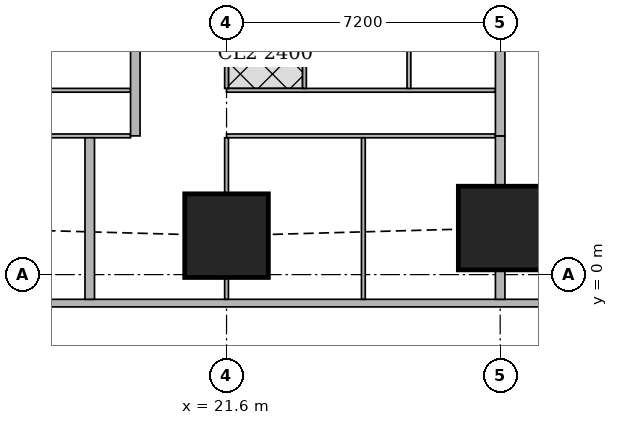
"""IFC4 building model, lengths in metres.
Left out: names, types, materials, properties, quantities, classifications, styles, units other than length and angle.
Written with IfcOpenShell. Run it as: python <this file> out.ifc"""

import sys

from ifc_helpers import new_model, si_unit, direction, frame, frame_2d, origin, origin_2d, place, context, subcontext, project, spatial, rectangle, extrude, element, fill, save


model = new_model("IFC4")
c1 = context("Model", 3, precision=1e-05, world=origin(), true_north=direction((0.0, 1.0)))
c2 = subcontext(c1, "Body", "Model", "MODEL_VIEW")
j1 = project(units=[si_unit("LENGTHUNIT", "METRE"), si_unit("PLANEANGLEUNIT", "RADIAN")], contexts=[c1])
p1 = place(None, origin())
s1 = spatial("IfcSite", under=j1, at=p1, CompositionType="ELEMENT")
p2 = place(p1, origin())
s2 = spatial("IfcBuilding", under=s1, at=p2, CompositionType="ELEMENT")
p3 = place(p2, frame((0.0, 0.0, 111.65)))
s3 = spatial("IfcBuildingStorey", under=s2, at=p3, CompositionType="ELEMENT", Elevation=111.65)
for number, where, z_axis, x_axis in (
    (1, (21.6, 1.025, 0.0), (0.0, 0.0, 1.0), (1.0, 0.0, 0.0)),
    (2, (28.8, 1.225, 0.0), (0.0, 0.0, 1.0), (1.0, 0.0, 0.0)),
):
    element("IfcColumn", number, at=place(p3, frame(where, z_axis=z_axis, x_axis=x_axis)), inside=s3, PredefinedType="COLUMN", context=c2, shape_type="SweptSolid", body=[
        extrude(rectangle(XDim=2.2, YDim=2.2, at=origin_2d()), origin(), (0.0, 0.0, 1.0), 3.75),
    ])
p4 = place(p3, frame((2.163, -0.75, 0.0), z_axis=(0.0, 0.0, 1.0), x_axis=(1.0, 0.0, 0.0)))
e3 = element("IfcWall", 3, at=p4, inside=s3, PredefinedType="SOLIDWALL", context=c2, shape_type="SweptSolid", body=[
    extrude(rectangle(XDim=45.628, YDim=0.2, at=frame_2d((22.814, 0.0))), origin(), (0.0, 0.0, 1.0), 3.5),
])
p5 = place(p4, frame((9.537, 0.0, 0.9)))
e4 = element("IfcOpeningElement", 4, at=p5, cuts=e3, PredefinedType="OPENING", context=c2, shape_type="SweptSolid", body=[
    extrude(rectangle(XDim=1.8, YDim=1.5, at=frame_2d((0.9, 0.75))), frame((0.0, 0.11, 0.0), z_axis=(0.0, -1.0, 0.0), x_axis=(1.0, 0.0, 0.0)), (0.0, 0.0, 1.0), 0.22),
])
p6 = place(p4, frame((13.137, 0.0, 0.9)))
e5 = element("IfcOpeningElement", 5, at=p6, cuts=e3, PredefinedType="OPENING", context=c2, shape_type="SweptSolid", body=[
    extrude(rectangle(XDim=1.8, YDim=1.5, at=frame_2d((0.9, 0.75))), frame((0.0, 0.11, 0.0), z_axis=(0.0, -1.0, 0.0), x_axis=(1.0, 0.0, 0.0)), (0.0, 0.0, 1.0), 0.22),
])
p7 = place(p4, frame((16.737, 0.0, 0.9)))
e6 = element("IfcOpeningElement", 6, at=p7, cuts=e3, PredefinedType="OPENING", context=c2, shape_type="SweptSolid", body=[
    extrude(rectangle(XDim=1.8, YDim=1.5, at=frame_2d((0.9, 0.75))), frame((0.0, 0.11, 0.0), z_axis=(0.0, -1.0, 0.0), x_axis=(1.0, 0.0, 0.0)), (0.0, 0.0, 1.0), 0.22),
])
p8 = place(p4, frame((20.337, 0.0, 0.9)))
e7 = element("IfcOpeningElement", 7, at=p8, cuts=e3, PredefinedType="OPENING", context=c2, shape_type="SweptSolid", body=[
    extrude(rectangle(XDim=1.8, YDim=1.5, at=frame_2d((0.9, 0.75))), frame((0.0, 0.11, 0.0), z_axis=(0.0, -1.0, 0.0), x_axis=(1.0, 0.0, 0.0)), (0.0, 0.0, 1.0), 0.22),
])
p9 = place(p4, frame((23.937, 0.0, 0.9)))
e8 = element("IfcOpeningElement", 8, at=p9, cuts=e3, PredefinedType="OPENING", context=c2, shape_type="SweptSolid", body=[
    extrude(rectangle(XDim=1.8, YDim=1.5, at=frame_2d((0.9, 0.75))), frame((0.0, 0.11, 0.0), z_axis=(0.0, -1.0, 0.0), x_axis=(1.0, 0.0, 0.0)), (0.0, 0.0, 1.0), 0.22),
])
p10 = place(p4, frame((27.537, 0.0, 0.9)))
e9 = element("IfcOpeningElement", 9, at=p10, cuts=e3, PredefinedType="OPENING", context=c2, shape_type="SweptSolid", body=[
    extrude(rectangle(XDim=1.8, YDim=1.5, at=frame_2d((0.9, 0.75))), frame((0.0, 0.11, 0.0), z_axis=(0.0, -1.0, 0.0), x_axis=(1.0, 0.0, 0.0)), (0.0, 0.0, 1.0), 0.22),
])
p11 = place(p4, frame((31.137, 0.0, 0.9)))
e10 = element("IfcOpeningElement", 10, at=p11, cuts=e3, PredefinedType="OPENING", context=c2, shape_type="SweptSolid", body=[
    extrude(rectangle(XDim=1.8, YDim=1.5, at=frame_2d((0.9, 0.75))), frame((0.0, 0.11, 0.0), z_axis=(0.0, -1.0, 0.0), x_axis=(1.0, 0.0, 0.0)), (0.0, 0.0, 1.0), 0.22),
])
p12 = place(p4, frame((34.737, 0.0, 0.9)))
e11 = element("IfcOpeningElement", 11, at=p12, cuts=e3, PredefinedType="OPENING", context=c2, shape_type="SweptSolid", body=[
    extrude(rectangle(XDim=1.8, YDim=1.5, at=frame_2d((0.9, 0.75))), frame((0.0, 0.11, 0.0), z_axis=(0.0, -1.0, 0.0), x_axis=(1.0, 0.0, 0.0)), (0.0, 0.0, 1.0), 0.22),
])
p13 = place(p3, frame((19.074, 3.65, 0.0), z_axis=(0.0, 0.0, 1.0), x_axis=(-1.0, 0.0, 0.0)))
e12 = element("IfcWall", 12, at=p13, inside=s3, PredefinedType="PARTITIONING", context=c2, shape_type="SweptSolid", body=[
    extrude(rectangle(XDim=4.674, YDim=0.1, at=frame_2d((2.337, 0.0))), origin(), (0.0, 0.0, 1.0), 3.5),
])
p14 = place(p13, frame((3.574, 0.0, 0.0)))
e13 = element("IfcOpeningElement", 13, at=p14, cuts=e12, PredefinedType="OPENING", context=c2, shape_type="SweptSolid", body=[
    extrude(rectangle(XDim=0.9, YDim=2.1, at=frame_2d((0.45, 1.05))), frame((0.0, 0.06, 0.0), z_axis=(0.0, -1.0, 0.0), x_axis=(1.0, 0.0, 0.0)), (0.0, 0.0, 1.0), 0.12),
])
p15 = place(p3, frame((19.074, 4.85, 0.0), z_axis=(0.0, 0.0, 1.0), x_axis=(-1.0, 0.0, 0.0)))
e14 = element("IfcWall", 14, at=p15, inside=s3, PredefinedType="PARTITIONING", context=c2, shape_type="SweptSolid", body=[
    extrude(rectangle(XDim=4.674, YDim=0.1, at=frame_2d((2.337, 0.0))), origin(), (0.0, 0.0, 1.0), 3.5),
])
p16 = place(p15, frame((3.199, 0.0, 0.0)))
e15 = element("IfcOpeningElement", 15, at=p16, cuts=e14, PredefinedType="OPENING", context=c2, shape_type="SweptSolid", body=[
    extrude(rectangle(XDim=0.9, YDim=2.1, at=frame_2d((0.45, 1.05))), frame((0.0, 0.06, 0.0), z_axis=(0.0, -1.0, 0.0), x_axis=(1.0, 0.0, 0.0)), (0.0, 0.0, 1.0), 0.12),
])
p17 = place(p15, frame((0.799, 0.0, 0.0)))
e16 = element("IfcOpeningElement", 16, at=p17, cuts=e14, PredefinedType="OPENING", context=c2, shape_type="SweptSolid", body=[
    extrude(rectangle(XDim=0.9, YDim=2.1, at=frame_2d((0.45, 1.05))), frame((0.0, 0.06, 0.0), z_axis=(0.0, -1.0, 0.0), x_axis=(1.0, 0.0, 0.0)), (0.0, 0.0, 1.0), 0.12),
])
p18 = place(p3, frame((28.675, 3.65, 0.0), z_axis=(0.0, 0.0, 1.0), x_axis=(-1.0, 0.0, 0.0)))
e17 = element("IfcWall", 17, at=p18, inside=s3, PredefinedType="PARTITIONING", context=c2, shape_type="SweptSolid", body=[
    extrude(rectangle(XDim=7.075, YDim=0.1, at=frame_2d((3.538, 0.0))), origin(), (0.0, 0.0, 1.0), 3.5),
])
p19 = place(p18, frame((5.975, 0.0, 0.0)))
e18 = element("IfcOpeningElement", 18, at=p19, cuts=e17, PredefinedType="OPENING", context=c2, shape_type="SweptSolid", body=[
    extrude(rectangle(XDim=0.9, YDim=2.1, at=frame_2d((0.45, 1.05))), frame((0.0, 0.06, 0.0), z_axis=(0.0, -1.0, 0.0), x_axis=(1.0, 0.0, 0.0)), (0.0, 0.0, 1.0), 0.12),
])
p20 = place(p18, frame((2.375, 0.0, 0.0)))
e19 = element("IfcOpeningElement", 19, at=p20, cuts=e17, PredefinedType="OPENING", context=c2, shape_type="SweptSolid", body=[
    extrude(rectangle(XDim=0.9, YDim=2.1, at=frame_2d((0.45, 1.05))), frame((0.0, 0.06, 0.0), z_axis=(0.0, -1.0, 0.0), x_axis=(1.0, 0.0, 0.0)), (0.0, 0.0, 1.0), 0.12),
])
p21 = place(p3, frame((28.675, 4.85, 0.0), z_axis=(0.0, 0.0, 1.0), x_axis=(-1.0, 0.0, 0.0)))
e20 = element("IfcWall", 20, at=p21, inside=s3, PredefinedType="PARTITIONING", context=c2, shape_type="SweptSolid", body=[
    extrude(rectangle(XDim=7.075, YDim=0.1, at=frame_2d((3.538, 0.0))), origin(), (0.0, 0.0, 1.0), 3.5),
])
p22 = place(p21, frame((5.6, 0.0, 0.0)))
e21 = element("IfcOpeningElement", 21, at=p22, cuts=e20, PredefinedType="OPENING", context=c2, shape_type="SweptSolid", body=[
    extrude(rectangle(XDim=0.9, YDim=2.1, at=frame_2d((0.45, 1.05))), frame((0.0, 0.06, 0.0), z_axis=(0.0, -1.0, 0.0), x_axis=(1.0, 0.0, 0.0)), (0.0, 0.0, 1.0), 0.12),
])
p23 = place(p21, frame((0.626, 0.0, 0.0)))
e22 = element("IfcOpeningElement", 22, at=p23, cuts=e20, PredefinedType="OPENING", context=c2, shape_type="SweptSolid", body=[
    extrude(rectangle(XDim=0.9, YDim=2.1, at=frame_2d((0.45, 1.05))), frame((0.0, 0.06, 0.0), z_axis=(0.0, -1.0, 0.0), x_axis=(1.0, 0.0, 0.0)), (0.0, 0.0, 1.0), 0.12),
])
p24 = place(p21, frame((3.201, 0.0, 0.0)))
e23 = element("IfcOpeningElement", 23, at=p24, cuts=e20, PredefinedType="OPENING", context=c2, shape_type="SweptSolid", body=[
    extrude(rectangle(XDim=0.9, YDim=2.1, at=frame_2d((0.45, 1.05))), frame((0.0, 0.06, 0.0), z_axis=(0.0, -1.0, 0.0), x_axis=(1.0, 0.0, 0.0)), (0.0, 0.0, 1.0), 0.12),
])
p25 = place(p3, frame((21.6, -0.65, 0.0), z_axis=(0.0, 0.0, 1.0), x_axis=(0.0, 1.0, 0.0)))
e24 = element("IfcWall", 24, at=p25, inside=s3, PredefinedType="PARTITIONING", context=c2, shape_type="SweptSolid", body=[
    extrude(rectangle(XDim=0.574, YDim=0.1, at=frame_2d((0.287, 0.0))), origin(), (0.0, 0.0, 1.0), 3.5),
])
p26 = place(p3, frame((21.6, 2.126, 0.0), z_axis=(0.0, 0.0, 1.0), x_axis=(0.0, 1.0, 0.0)))
e25 = element("IfcWall", 25, at=p26, inside=s3, PredefinedType="PARTITIONING", context=c2, shape_type="SweptSolid", body=[
    extrude(rectangle(XDim=1.474, YDim=0.1, at=frame_2d((0.737, 0.0))), origin(), (0.0, 0.0, 1.0), 3.5),
])
p27 = place(p3, frame((25.2, -0.65, 0.0), z_axis=(0.0, 0.0, 1.0), x_axis=(0.0, 1.0, 0.0)))
e26 = element("IfcWall", 26, at=p27, inside=s3, PredefinedType="PARTITIONING", context=c2, shape_type="SweptSolid", body=[
    extrude(rectangle(XDim=4.25, YDim=0.1, at=frame_2d((2.125, 0.0))), origin(), (0.0, 0.0, 1.0), 2.2),
])
p28 = place(p3, frame((21.6, 4.9, 0.0), z_axis=(0.0, 0.0, 1.0), x_axis=(0.0, 1.0, 0.0)))
e27 = element("IfcWall", 27, at=p28, inside=s3, PredefinedType="PARTITIONING", context=c2, shape_type="SweptSolid", body=[
    extrude(rectangle(XDim=1.799, YDim=0.1, at=frame_2d((0.899, 0.0))), origin(), (0.0, 0.0, 1.0), 3.5),
])
for number, where, z_axis, x_axis in (
    (28, (26.399, 4.9, 0.0), (0.0, 0.0, 1.0), (0.0, 1.0, 0.0)),
    (29, (23.65, 4.9, 0.0), (0.0, 0.0, 1.0), (0.0, 1.0, 0.0)),
):
    element("IfcWall", number, at=place(p3, frame(where, z_axis=z_axis, x_axis=x_axis)), inside=s3, PredefinedType="PARTITIONING", context=c2, shape_type="SweptSolid", body=[
        extrude(rectangle(XDim=3.525, YDim=0.1, at=frame_2d((1.763, 0.0))), origin(), (0.0, 0.0, 1.0), 3.5),
    ])
p29 = place(p3, frame((18.0, -0.65, 0.0), z_axis=(0.0, 0.0, 1.0), x_axis=(0.0, 1.0, 0.0)))
e30 = element("IfcWall", 30, at=p29, inside=s3, PredefinedType="SOLIDWALL", context=c2, shape_type="SweptSolid", body=[
    extrude(rectangle(XDim=4.25, YDim=0.25, at=frame_2d((2.125, 0.0))), origin(), (0.0, 0.0, 1.0), 2.2),
])
p30 = place(p3, frame((19.199, 3.65, 0.0), z_axis=(0.0, 0.0, 1.0), x_axis=(0.0, 1.0, 0.0)))
e31 = element("IfcWall", 31, at=p30, inside=s3, PredefinedType="SOLIDWALL", context=c2, shape_type="SweptSolid", body=[
    extrude(rectangle(XDim=4.775, YDim=0.25, at=frame_2d((2.388, 0.0))), origin(), (0.0, 0.0, 1.0), 3.5),
])
p31 = place(p3, frame((28.8, -0.65, 0.0), z_axis=(0.0, 0.0, 1.0), x_axis=(0.0, 1.0, 0.0)))
e32 = element("IfcWall", 32, at=p31, inside=s3, PredefinedType="SOLIDWALL", context=c2, shape_type="SweptSolid", body=[
    extrude(rectangle(XDim=0.774, YDim=0.25, at=frame_2d((0.387, 0.0))), origin(), (0.0, 0.0, 1.0), 3.5),
])
p32 = place(p3, frame((28.8, 2.326, 0.0), z_axis=(0.0, 0.0, 1.0), x_axis=(0.0, 1.0, 0.0)))
e33 = element("IfcWall", 33, at=p32, inside=s3, PredefinedType="SOLIDWALL", context=c2, shape_type="SweptSolid", body=[
    extrude(rectangle(XDim=1.324, YDim=0.25, at=frame_2d((0.662, 0.0))), origin(), (0.0, 0.0, 1.0), 3.5),
])
p33 = place(p3, frame((28.8, 3.65, 0.0), z_axis=(0.0, 0.0, 1.0), x_axis=(0.0, 1.0, 0.0)))
e34 = element("IfcWall", 34, at=p33, inside=s3, PredefinedType="SOLIDWALL", context=c2, shape_type="SweptSolid", body=[
    extrude(rectangle(XDim=3.049, YDim=0.25, at=frame_2d((1.524, 0.0))), origin(), (0.0, 0.0, 1.0), 3.5),
])
p34 = place(p6, origin())
e35 = element("IfcWindow", 35, at=p34, inside=s3, PartitioningType="SINGLE_PANEL", PredefinedType="WINDOW", context=c2, shape_type="SweptSolid", body=[
    extrude(rectangle(XDim=1.8, YDim=1.5, at=frame_2d((0.9, 0.75))), frame((0.0, 0.03, 0.0), z_axis=(0.0, -1.0, 0.0), x_axis=(1.0, 0.0, 0.0)), (0.0, 0.0, 1.0), 0.06),
])
fill(e5, e35)
p35 = place(p7, origin())
e36 = element("IfcWindow", 36, at=p35, inside=s3, PartitioningType="SINGLE_PANEL", PredefinedType="WINDOW", context=c2, shape_type="SweptSolid", body=[
    extrude(rectangle(XDim=1.8, YDim=1.5, at=frame_2d((0.9, 0.75))), frame((0.0, 0.03, 0.0), z_axis=(0.0, -1.0, 0.0), x_axis=(1.0, 0.0, 0.0)), (0.0, 0.0, 1.0), 0.06),
])
fill(e6, e36)
p36 = place(p8, origin())
e37 = element("IfcWindow", 37, at=p36, inside=s3, PartitioningType="SINGLE_PANEL", PredefinedType="WINDOW", context=c2, shape_type="SweptSolid", body=[
    extrude(rectangle(XDim=1.8, YDim=1.5, at=frame_2d((0.9, 0.75))), frame((0.0, 0.03, 0.0), z_axis=(0.0, -1.0, 0.0), x_axis=(1.0, 0.0, 0.0)), (0.0, 0.0, 1.0), 0.06),
])
fill(e7, e37)
p37 = place(p9, origin())
e38 = element("IfcWindow", 38, at=p37, inside=s3, PartitioningType="SINGLE_PANEL", PredefinedType="WINDOW", context=c2, shape_type="SweptSolid", body=[
    extrude(rectangle(XDim=1.8, YDim=1.5, at=frame_2d((0.9, 0.75))), frame((0.0, 0.03, 0.0), z_axis=(0.0, -1.0, 0.0), x_axis=(1.0, 0.0, 0.0)), (0.0, 0.0, 1.0), 0.06),
])
fill(e8, e38)
p38 = place(p10, origin())
e39 = element("IfcWindow", 39, at=p38, inside=s3, PartitioningType="SINGLE_PANEL", PredefinedType="WINDOW", context=c2, shape_type="SweptSolid", body=[
    extrude(rectangle(XDim=1.8, YDim=1.5, at=frame_2d((0.9, 0.75))), frame((0.0, 0.03, 0.0), z_axis=(0.0, -1.0, 0.0), x_axis=(1.0, 0.0, 0.0)), (0.0, 0.0, 1.0), 0.06),
])
fill(e9, e39)
p39 = place(p17, origin())
e40 = element("IfcDoor", 40, at=p39, inside=s3, OperationType="SINGLE_SWING_RIGHT", PredefinedType="DOOR", context=c2, shape_type="SweptSolid", body=[
    extrude(rectangle(XDim=0.9, YDim=2.1, at=frame_2d((0.45, 1.05))), frame((0.0, 0.025, 0.0), z_axis=(0.0, -1.0, 0.0), x_axis=(1.0, 0.0, 0.0)), (0.0, 0.0, 1.0), 0.05),
])
fill(e16, e40)
p40 = place(p19, origin())
e41 = element("IfcDoor", 41, at=p40, inside=s3, OperationType="SINGLE_SWING_RIGHT", PredefinedType="DOOR", context=c2, shape_type="SweptSolid", body=[
    extrude(rectangle(XDim=0.9, YDim=2.1, at=frame_2d((0.45, 1.05))), frame((0.0, 0.025, 0.0), z_axis=(0.0, -1.0, 0.0), x_axis=(1.0, 0.0, 0.0)), (0.0, 0.0, 1.0), 0.05),
])
fill(e18, e41)
p41 = place(p20, origin())
e42 = element("IfcDoor", 42, at=p41, inside=s3, OperationType="SINGLE_SWING_RIGHT", PredefinedType="DOOR", context=c2, shape_type="SweptSolid", body=[
    extrude(rectangle(XDim=0.9, YDim=2.1, at=frame_2d((0.45, 1.05))), frame((0.0, 0.025, 0.0), z_axis=(0.0, -1.0, 0.0), x_axis=(1.0, 0.0, 0.0)), (0.0, 0.0, 1.0), 0.05),
])
fill(e19, e42)
p42 = place(p22, origin())
e43 = element("IfcDoor", 43, at=p42, inside=s3, OperationType="SINGLE_SWING_LEFT", PredefinedType="DOOR", context=c2, shape_type="SweptSolid", body=[
    extrude(rectangle(XDim=0.9, YDim=2.1, at=frame_2d((0.45, 1.05))), frame((0.0, 0.025, 0.0), z_axis=(0.0, -1.0, 0.0), x_axis=(1.0, 0.0, 0.0)), (0.0, 0.0, 1.0), 0.05),
])
fill(e21, e43)
p43 = place(p23, origin())
e44 = element("IfcDoor", 44, at=p43, inside=s3, OperationType="SINGLE_SWING_RIGHT", PredefinedType="DOOR", context=c2, shape_type="SweptSolid", body=[
    extrude(rectangle(XDim=0.9, YDim=2.1, at=frame_2d((0.45, 1.05))), frame((0.0, 0.025, 0.0), z_axis=(0.0, -1.0, 0.0), x_axis=(1.0, 0.0, 0.0)), (0.0, 0.0, 1.0), 0.05),
])
fill(e22, e44)
p44 = place(p24, origin())
e45 = element("IfcDoor", 45, at=p44, inside=s3, OperationType="SINGLE_SWING_RIGHT", PredefinedType="DOOR", context=c2, shape_type="SweptSolid", body=[
    extrude(rectangle(XDim=0.9, YDim=2.1, at=frame_2d((0.45, 1.05))), frame((0.0, 0.025, 0.0), z_axis=(0.0, -1.0, 0.0), x_axis=(1.0, 0.0, 0.0)), (0.0, 0.0, 1.0), 0.05),
])
fill(e23, e45)
save(model, sys.argv[1])
